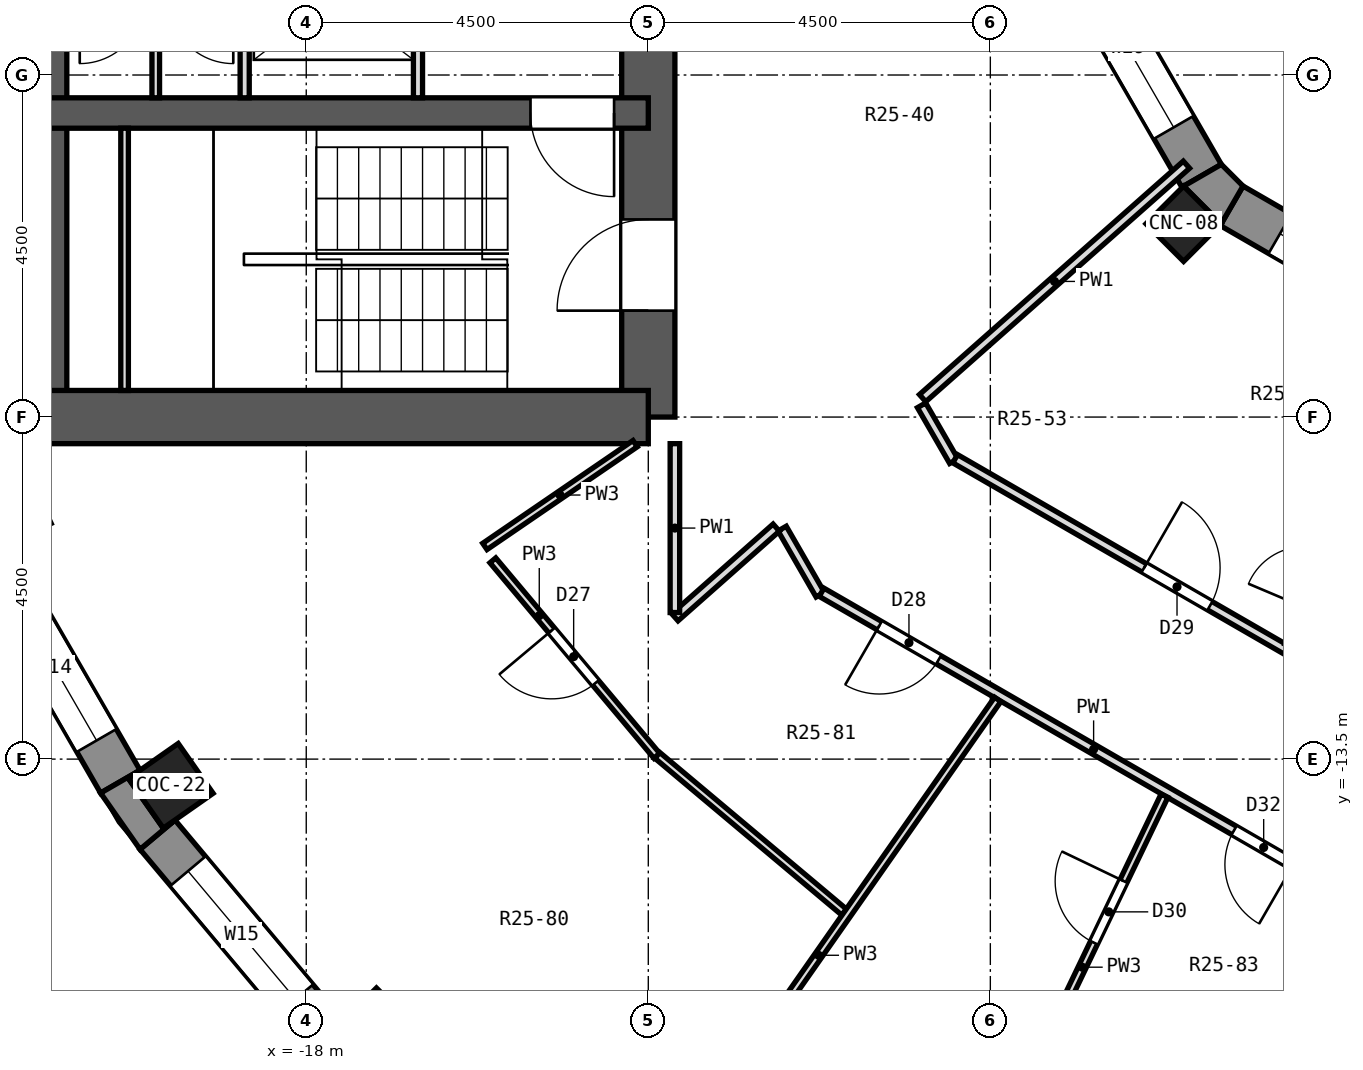
"""IFC4 building model, lengths in metres.
Left out: names, types, materials, properties, quantities, classifications, styles, units other than length and angle.
Written with IfcOpenShell. Run it as: python <this file> out.ifc"""

import sys

from ifc_helpers import new_model, si_unit, direction, frame, frame_2d, origin, origin_2d, place, context, subcontext, project, spatial, polyline, rectangle, outline, extrude, element, fill, save


model = new_model("IFC4")
c1 = context("Model", 3, precision=1e-05, world=origin(), true_north=direction((0.0, 1.0)))
c2 = subcontext(c1, "Body", "Model", "MODEL_VIEW")
j1 = project(units=[si_unit("LENGTHUNIT", "METRE"), si_unit("PLANEANGLEUNIT", "RADIAN")], contexts=[c1])
p1 = place(None, origin())
s1 = spatial("IfcSite", under=j1, at=p1, CompositionType="ELEMENT")
p2 = place(p1, origin())
s2 = spatial("IfcBuilding", under=s1, at=p2, CompositionType="ELEMENT")
p3 = place(p2, frame((0.0, 0.0, 160.8)))
s3 = spatial("IfcBuildingStorey", under=s2, at=p3, CompositionType="ELEMENT", Elevation=160.8)
for number, where, z_axis, x_axis in (
    (1, (-19.782, -13.852, 0.0), (0.0, 0.0, 1.0), (-0.819, -0.574, 0.0)),
    (2, (-17.077, -17.077, 0.0), (0.0, 0.0, 1.0), (-0.707, -0.707, 0.0)),
):
    element("IfcColumn", number, at=place(p3, frame(where, z_axis=z_axis, x_axis=x_axis)), inside=s3, PredefinedType="COLUMN", context=c2, shape_type="SweptSolid", body=[
        extrude(rectangle(XDim=0.8, YDim=0.8, at=origin_2d()), origin(), (0.0, 0.0, 1.0), 3.3),
    ])
p4 = place(p3, frame((-6.458, -6.458, 0.0), z_axis=(0.0, 0.0, 1.0), x_axis=(-0.707106781187, -0.707106781187, 0.0)))
e3 = element("IfcColumn", 3, at=p4, inside=s3, PredefinedType="COLUMN", context=c2, shape_type="SweptSolid", body=[
    extrude(rectangle(XDim=0.7, YDim=0.7, at=origin_2d()), origin(), (0.0, 0.0, 1.0), 3.3),
])
p5 = place(p3, frame((-13.5, -9.0, 0.0), z_axis=(0.0, 0.0, 1.0), x_axis=(0.0, 1.0, 0.0)))
e4 = element("IfcWall", 4, at=p5, inside=s3, PredefinedType="SHEAR", context=c2, shape_type="SweptSolid", body=[
    extrude(rectangle(XDim=18.0, YDim=0.7, at=frame_2d((9.0, 0.0))), origin(), (0.0, 0.0, 1.0), 3.3),
])
p6 = place(p5, frame((15.4, 0.0, 0.0)))
e5 = element("IfcOpeningElement", 5, at=p6, cuts=e4, PredefinedType="OPENING", context=c2, shape_type="SweptSolid", body=[
    extrude(rectangle(XDim=1.2, YDim=2.1, at=frame_2d((0.6, 1.05))), frame((0.0, 0.362, 0.0), z_axis=(0.0, -1.0, 0.0), x_axis=(1.0, 0.0, 0.0)), (0.0, 0.0, 1.0), 0.724),
])
p7 = place(p5, frame((1.4, 0.0, 0.0)))
e6 = element("IfcOpeningElement", 6, at=p7, cuts=e4, PredefinedType="OPENING", context=c2, shape_type="SweptSolid", body=[
    extrude(rectangle(XDim=1.2, YDim=2.1, at=frame_2d((0.6, 1.05))), frame((0.0, 0.362, 0.0), z_axis=(0.0, -1.0, 0.0), x_axis=(1.0, 0.0, 0.0)), (0.0, 0.0, 1.0), 0.724),
])
p8 = place(p5, frame((7.5, 0.0, 0.0)))
e7 = element("IfcOpeningElement", 7, at=p8, cuts=e4, PredefinedType="OPENING", context=c2, shape_type="SweptSolid", body=[
    extrude(rectangle(XDim=3.0, YDim=2.4, at=frame_2d((1.5, 1.2))), frame((0.0, 0.362, 0.0), z_axis=(0.0, -1.0, 0.0), x_axis=(1.0, 0.0, 0.0)), (0.0, 0.0, 1.0), 0.724),
])
p9 = place(p3, frame((-21.5, -9.0, 0.0), z_axis=(0.0, 0.0, 1.0), x_axis=(0.0, 1.0, 0.0)))
e8 = element("IfcWall", 8, at=p9, inside=s3, PredefinedType="SHEAR", context=c2, shape_type="SweptSolid", body=[
    extrude(rectangle(XDim=18.0, YDim=0.7, at=frame_2d((9.0, 0.0))), origin(), (0.0, 0.0, 1.0), 3.3),
])
p10 = place(p9, frame((9.45, 0.0, 0.0)))
e9 = element("IfcOpeningElement", 9, at=p10, cuts=e8, PredefinedType="OPENING", context=c2, shape_type="SweptSolid", body=[
    extrude(rectangle(XDim=0.9, YDim=2.1, at=frame_2d((0.45, 1.05))), frame((0.0, 0.362, 0.0), z_axis=(0.0, -1.0, 0.0), x_axis=(1.0, 0.0, 0.0)), (0.0, 0.0, 1.0), 0.724),
])
p11 = place(p9, frame((7.65, 0.0, 0.0)))
e10 = element("IfcOpeningElement", 10, at=p11, cuts=e8, PredefinedType="OPENING", context=c2, shape_type="SweptSolid", body=[
    extrude(rectangle(XDim=0.9, YDim=2.1, at=frame_2d((0.45, 1.05))), frame((0.0, 0.362, 0.0), z_axis=(0.0, -1.0, 0.0), x_axis=(1.0, 0.0, 0.0)), (0.0, 0.0, 1.0), 0.724),
])
p12 = place(p3, frame((-13.5, -9.0, 0.0), z_axis=(0.0, 0.0, 1.0), x_axis=(-1.0, 0.0, 0.0)))
e11 = element("IfcWall", 11, at=p12, inside=s3, PredefinedType="SHEAR", context=c2, shape_type="SweptSolid", body=[
    extrude(rectangle(XDim=8.0, YDim=0.7, at=frame_2d((4.0, 0.0))), origin(), (0.0, 0.0, 1.0), 3.3),
])
p13 = place(p3, frame((-13.5, -5.0, 0.0), z_axis=(0.0, 0.0, 1.0), x_axis=(-1.0, 0.0, 0.0)))
e12 = element("IfcWall", 12, at=p13, inside=s3, PredefinedType="SHEAR", context=c2, shape_type="SweptSolid", body=[
    extrude(rectangle(XDim=8.0, YDim=0.4, at=frame_2d((4.0, 0.0))), origin(), (0.0, 0.0, 1.0), 3.3),
])
p14 = place(p13, frame((0.45, 0.0, 0.0)))
e13 = element("IfcOpeningElement", 13, at=p14, cuts=e12, PredefinedType="OPENING", context=c2, shape_type="SweptSolid", body=[
    extrude(rectangle(XDim=1.1, YDim=2.1, at=frame_2d((0.55, 1.05))), frame((0.0, 0.212, 0.0), z_axis=(0.0, -1.0, 0.0), x_axis=(1.0, 0.0, 0.0)), (0.0, 0.0, 1.0), 0.424),
])
p15 = place(p3, frame((-22.171, -10.809, 0.0), z_axis=(0.0, 0.0, 1.0), x_axis=(0.499998129301, -0.86602648383, 0.0)))
e14 = element("IfcWall", 14, at=p15, inside=s3, PredefinedType="SOLIDWALL", context=c2, shape_type="SweptSolid", body=[
    extrude(rectangle(XDim=3.45, YDim=0.6, at=frame_2d((1.725, 0.0))), origin(), (0.0, 0.0, 1.0), 2.85),
])
p16 = place(p15, frame((0.625, 0.0, 0.9)))
e15 = element("IfcOpeningElement", 15, at=p16, cuts=e14, PredefinedType="OPENING", context=c2, shape_type="SweptSolid", body=[
    extrude(rectangle(XDim=2.2, YDim=1.8, at=frame_2d((1.1, 0.9))), frame((0.0, 0.312, 0.0), z_axis=(0.0, -1.0, 0.0), x_axis=(1.0, 0.0, 0.0)), (0.0, 0.0, 1.0), 0.624),
])
p17 = place(p3, frame((-19.957, -14.494, 0.0), z_axis=(0.0, 0.0, 1.0), x_axis=(0.642770398358, -0.766058884809, 0.0)))
e16 = element("IfcWall", 16, at=p17, inside=s3, PredefinedType="SOLIDWALL", context=c2, shape_type="SweptSolid", body=[
    extrude(rectangle(XDim=3.449, YDim=0.6, at=frame_2d((1.725, 0.0))), origin(), (0.0, 0.0, 1.0), 2.85),
])
p18 = place(p17, frame((0.625, 0.0, 0.9)))
e17 = element("IfcOpeningElement", 17, at=p18, cuts=e16, PredefinedType="OPENING", context=c2, shape_type="SweptSolid", body=[
    extrude(rectangle(XDim=2.2, YDim=1.8, at=frame_2d((1.1, 0.9))), frame((0.0, 0.312, 0.0), z_axis=(0.0, -1.0, 0.0), x_axis=(1.0, 0.0, 0.0)), (0.0, 0.0, 1.0), 0.624),
])
p19 = place(p3, origin())
e18 = element("IfcWall", 18, at=p19, inside=s3, PredefinedType="SOLIDWALL", context=c2, shape_type="SweptSolid", body=[
    extrude(outline(polyline([(-20.706, -13.946), (-20.187, -14.687), (-19.727, -14.302), (-19.881, -14.409), (-20.34, -13.754), (-20.186, -13.646), (-20.706, -13.946)])), origin(), (0.0, 0.0, 1.0), 2.85),
])
p20 = place(p3, frame((-8.156, -2.474, 0.0), z_axis=(0.0, 0.0, 1.0), x_axis=(0.500033728941, -0.866005929495, 0.0)))
e19 = element("IfcWall", 19, at=p20, inside=s3, PredefinedType="SOLIDWALL", context=c2, shape_type="SweptSolid", body=[
    extrude(rectangle(XDim=3.87, YDim=0.6, at=frame_2d((1.935, 0.0))), origin(), (0.0, 0.0, 1.0), 2.85),
])
p21 = place(p20, frame((0.735, 0.0, 0.9)))
e20 = element("IfcOpeningElement", 20, at=p21, cuts=e19, PredefinedType="OPENING", context=c2, shape_type="SweptSolid", body=[
    extrude(rectangle(XDim=2.4, YDim=1.8, at=frame_2d((1.2, 0.9))), frame((0.0, 0.312, 0.0), z_axis=(0.0, -1.0, 0.0), x_axis=(1.0, 0.0, 0.0)), (0.0, 0.0, 1.0), 0.624),
])
p22 = place(p3, frame((-5.826, -6.22, 0.0), z_axis=(0.0, 0.0, 1.0), x_axis=(0.866005929495, -0.500033728941, 0.0)))
e21 = element("IfcWall", 21, at=p22, inside=s3, PredefinedType="SOLIDWALL", context=c2, shape_type="SweptSolid", body=[
    extrude(rectangle(XDim=3.87, YDim=0.6, at=frame_2d((1.935, 0.0))), origin(), (0.0, 0.0, 1.0), 2.85),
])
p23 = place(p22, frame((0.735, 0.0, 0.9)))
e22 = element("IfcOpeningElement", 22, at=p23, cuts=e21, PredefinedType="OPENING", context=c2, shape_type="SweptSolid", body=[
    extrude(rectangle(XDim=2.4, YDim=1.8, at=frame_2d((1.2, 0.9))), frame((0.0, 0.312, 0.0), z_axis=(0.0, -1.0, 0.0), x_axis=(1.0, 0.0, 0.0)), (0.0, 0.0, 1.0), 0.624),
])
p24 = place(p3, origin())
e23 = element("IfcWall", 23, at=p24, inside=s3, PredefinedType="SOLIDWALL", context=c2, shape_type="SweptSolid", body=[
    extrude(outline(polyline([(-6.458, -5.962), (-5.962, -6.458), (-5.676, -5.961), (-5.961, -5.676), (-6.458, -5.962)])), origin(), (0.0, 0.0, 1.0), 2.85),
])
p25 = place(p3, frame((-11.739, -10.467, 0.0), z_axis=(0.0, 0.0, 1.0), x_axis=(0.499097354853, -0.866545919371, 0.0)))
e24 = element("IfcWall", 24, at=p25, inside=s3, PredefinedType="PARTITIONING", context=c2, shape_type="SweptSolid", body=[
    extrude(rectangle(XDim=1.003, YDim=0.125, at=frame_2d((0.501, 0.0))), origin(), (0.0, 0.0, 1.0), 2.85),
])
p26 = place(p3, frame((-9.905, -8.845, 0.0), z_axis=(0.0, 0.0, 1.0), x_axis=(0.499855389907, -0.866108878364, 0.0)))
e25 = element("IfcWall", 25, at=p26, inside=s3, PredefinedType="PARTITIONING", context=c2, shape_type="SweptSolid", body=[
    extrude(rectangle(XDim=0.848, YDim=0.125, at=frame_2d((0.424, 0.0))), origin(), (0.0, 0.0, 1.0), 2.85),
])
p27 = place(p3, frame((-15.545, -10.885, 0.0), z_axis=(0.0, 0.0, 1.0), x_axis=(0.642690725871, -0.766125727854, 0.0)))
e26 = element("IfcWall", 26, at=p27, inside=s3, PredefinedType="PARTITIONING", context=c2, shape_type="SweptSolid", body=[
    extrude(rectangle(XDim=3.358, YDim=0.1, at=frame_2d((1.679, 0.0))), origin(), (0.0, 0.0, 1.0), 2.85),
])
p28 = place(p27, frame((1.204, 0.0, 0.0)))
e27 = element("IfcOpeningElement", 27, at=p28, cuts=e26, PredefinedType="OPENING", context=c2, shape_type="SweptSolid", body=[
    extrude(rectangle(XDim=0.9, YDim=2.1, at=frame_2d((0.45, 1.05))), frame((0.0, 0.062, 0.0), z_axis=(0.0, -1.0, 0.0), x_axis=(1.0, 0.0, 0.0)), (0.0, 0.0, 1.0), 0.124),
])
p29 = place(p3, frame((-13.381, -13.451, 0.0), z_axis=(0.0, 0.0, 1.0), x_axis=(0.766064597799, -0.642763589509, 0.0)))
e28 = element("IfcWall", 28, at=p29, inside=s3, PredefinedType="PARTITIONING", context=c2, shape_type="SweptSolid", body=[
    extrude(rectangle(XDim=3.208, YDim=0.1, at=frame_2d((1.604, 0.0))), origin(), (0.0, 0.0, 1.0), 2.85),
])
p30 = place(p3, frame((-11.22, -11.305, 0.0), z_axis=(0.0, 0.0, 1.0), x_axis=(0.866074891173, -0.499914275531, 0.0)))
e29 = element("IfcWall", 29, at=p30, inside=s3, PredefinedType="PARTITIONING", context=c2, shape_type="SweptSolid", body=[
    extrude(rectangle(XDim=8.263, YDim=0.125, at=frame_2d((4.132, 0.0))), origin(), (0.0, 0.0, 1.0), 2.85),
])
p31 = place(p30, frame((0.877, 0.0, 0.0)))
e30 = element("IfcOpeningElement", 30, at=p31, cuts=e29, PredefinedType="OPENING", context=c2, shape_type="SweptSolid", body=[
    extrude(rectangle(XDim=0.9, YDim=2.1, at=frame_2d((0.45, 1.05))), frame((0.0, 0.074, 0.0), z_axis=(0.0, -1.0, 0.0), x_axis=(1.0, 0.0, 0.0)), (0.0, 0.0, 1.0), 0.149),
])
p32 = place(p30, frame((6.265, 0.0, 0.0)))
e31 = element("IfcOpeningElement", 31, at=p32, cuts=e29, PredefinedType="OPENING", context=c2, shape_type="SweptSolid", body=[
    extrude(rectangle(XDim=0.9, YDim=2.1, at=frame_2d((0.45, 1.05))), frame((0.0, 0.074, 0.0), z_axis=(0.0, -1.0, 0.0), x_axis=(1.0, 0.0, 0.0)), (0.0, 0.0, 1.0), 0.149),
])
p33 = place(p3, frame((-9.463, -9.548, 0.0), z_axis=(0.0, 0.0, 1.0), x_axis=(0.866077207726, -0.499910262205, 0.0)))
e32 = element("IfcWall", 32, at=p33, inside=s3, PredefinedType="PARTITIONING", context=c2, shape_type="SweptSolid", body=[
    extrude(rectangle(XDim=6.977, YDim=0.125, at=frame_2d((3.488, 0.0))), origin(), (0.0, 0.0, 1.0), 2.85),
])
p34 = place(p33, frame((2.87, 0.0, 0.0)))
e33 = element("IfcOpeningElement", 33, at=p34, cuts=e32, PredefinedType="OPENING", context=c2, shape_type="SweptSolid", body=[
    extrude(rectangle(XDim=1.0, YDim=2.1, at=frame_2d((0.5, 1.05))), frame((0.0, 0.074, 0.0), z_axis=(0.0, -1.0, 0.0), x_axis=(1.0, 0.0, 0.0)), (0.0, 0.0, 1.0), 0.149),
])
p35 = place(p3, frame((-15.65, -10.702, 0.0), z_axis=(0.0, 0.0, 1.0), x_axis=(0.82545226585, 0.564471927382, 0.0)))
e34 = element("IfcWall", 34, at=p35, inside=s3, PredefinedType="PARTITIONING", context=c2, shape_type="SweptSolid", body=[
    extrude(rectangle(XDim=2.395, YDim=0.1, at=frame_2d((1.197, 0.0))), origin(), (0.0, 0.0, 1.0), 2.85),
])
p36 = place(p3, frame((-13.15, -11.634, 0.0), z_axis=(0.0, 0.0, 1.0), x_axis=(0.748988708904, 0.662582760065, 0.0)))
e35 = element("IfcWall", 35, at=p36, inside=s3, PredefinedType="PARTITIONING", context=c2, shape_type="SweptSolid", body=[
    extrude(rectangle(XDim=1.78, YDim=0.125, at=frame_2d((0.89, 0.0))), origin(), (0.0, 0.0, 1.0), 2.85),
])
p37 = place(p3, frame((-9.891, -8.751, 0.0), z_axis=(0.0, 0.0, 1.0), x_axis=(0.748982485585, 0.662589794886, 0.0)))
e36 = element("IfcWall", 36, at=p37, inside=s3, PredefinedType="PARTITIONING", context=c2, shape_type="SweptSolid", body=[
    extrude(rectangle(XDim=4.635, YDim=0.125, at=frame_2d((2.317, 0.0))), origin(), (0.0, 0.0, 1.0), 2.85),
])
p38 = place(p3, frame((-13.617, -19.447, 0.0), z_axis=(0.0, 0.0, 1.0), x_axis=(0.573585951544, 0.819145381597, 0.0)))
e37 = element("IfcWall", 37, at=p38, inside=s3, PredefinedType="PARTITIONING", context=c2, shape_type="SweptSolid", body=[
    extrude(rectangle(XDim=8.218, YDim=0.1, at=frame_2d((4.109, 0.0))), origin(), (0.0, 0.0, 1.0), 2.85),
])
p39 = place(p3, frame((-8.202, -17.094, 0.0), z_axis=(0.0, 0.0, 1.0), x_axis=(0.432471241397, 0.901647727976, 0.0)))
e38 = element("IfcWall", 38, at=p39, inside=s3, PredefinedType="PARTITIONING", context=c2, shape_type="SweptSolid", body=[
    extrude(rectangle(XDim=3.452, YDim=0.1, at=frame_2d((1.726, 0.0))), origin(), (0.0, 0.0, 1.0), 2.85),
])
p40 = place(p39, frame((1.307, 0.0, 0.0)))
e39 = element("IfcOpeningElement", 39, at=p40, cuts=e38, PredefinedType="OPENING", context=c2, shape_type="SweptSolid", body=[
    extrude(rectangle(XDim=0.9, YDim=2.1, at=frame_2d((0.45, 1.05))), frame((0.0, 0.062, 0.0), z_axis=(0.0, -1.0, 0.0), x_axis=(1.0, 0.0, 0.0)), (0.0, 0.0, 1.0), 0.124),
])
p41 = place(p3, frame((-13.15, -11.572, 0.0), z_axis=(0.0, 0.0, 1.0), x_axis=(0.0, 1.0, 0.0)))
e40 = element("IfcWall", 40, at=p41, inside=s3, PredefinedType="PARTITIONING", context=c2, shape_type="SweptSolid", body=[
    extrude(rectangle(XDim=2.221, YDim=0.125, at=frame_2d((1.111, 0.0))), origin(), (0.0, 0.0, 1.0), 2.85),
])
p42 = place(p3, frame((-16.53, -4.8, 0.0), z_axis=(0.0, 0.0, 1.0), x_axis=(0.0, 1.0, 0.0)))
e41 = element("IfcWall", 41, at=p42, inside=s3, PredefinedType="PARTITIONING", context=c2, shape_type="SweptSolid", body=[
    extrude(rectangle(XDim=2.6, YDim=0.12, at=frame_2d((1.3, 0.0))), origin(), (0.0, 0.0, 1.0), 2.85),
])
p43 = place(p42, frame((0.75, 0.0, 0.0)))
e42 = element("IfcOpeningElement", 42, at=p43, cuts=e41, PredefinedType="OPENING", context=c2, shape_type="SweptSolid", body=[
    extrude(rectangle(XDim=1.1, YDim=2.1, at=frame_2d((0.55, 1.05))), frame((0.0, 0.072, 0.0), z_axis=(0.0, -1.0, 0.0), x_axis=(1.0, 0.0, 0.0)), (0.0, 0.0, 1.0), 0.144),
])
p44 = place(p3, frame((-18.81, -4.8, 0.0), z_axis=(0.0, 0.0, 1.0), x_axis=(0.0, 1.0, 0.0)))
e43 = element("IfcWall", 43, at=p44, inside=s3, PredefinedType="PARTITIONING", context=c2, shape_type="SweptSolid", body=[
    extrude(rectangle(XDim=2.6, YDim=0.12, at=frame_2d((1.3, 0.0))), origin(), (0.0, 0.0, 1.0), 2.85),
])
p45 = place(p3, frame((-19.98, -4.8, 0.0), z_axis=(0.0, 0.0, 1.0), x_axis=(0.0, 1.0, 0.0)))
e44 = element("IfcWall", 44, at=p45, inside=s3, PredefinedType="PARTITIONING", context=c2, shape_type="SweptSolid", body=[
    extrude(rectangle(XDim=2.6, YDim=0.1, at=frame_2d((1.3, 0.0))), origin(), (0.0, 0.0, 1.0), 2.85),
])
p46 = place(p3, frame((-20.39, -8.65, 0.0), z_axis=(0.0, 0.0, 1.0), x_axis=(0.0, 1.0, 0.0)))
e45 = element("IfcWall", 45, at=p46, inside=s3, PredefinedType="PARTITIONING", context=c2, shape_type="SweptSolid", body=[
    extrude(rectangle(XDim=3.45, YDim=0.1, at=frame_2d((1.725, 0.0))), origin(), (0.0, 0.0, 1.0), 2.85),
])
p47 = place(p16, origin())
e46 = element("IfcWindow", 46, at=p47, inside=s3, PartitioningType="SINGLE_PANEL", PredefinedType="WINDOW", context=c2, shape_type="SweptSolid", body=[
    extrude(rectangle(XDim=2.2, YDim=1.8, at=frame_2d((1.1, 0.9))), frame((0.0, 0.18, 0.0), z_axis=(0.0, -1.0, 0.0), x_axis=(1.0, 0.0, 0.0)), (0.0, 0.0, 1.0), 0.06),
])
fill(e15, e46)
p48 = place(p18, origin())
e47 = element("IfcWindow", 47, at=p48, inside=s3, PartitioningType="SINGLE_PANEL", PredefinedType="WINDOW", context=c2, shape_type="SweptSolid", body=[
    extrude(rectangle(XDim=2.2, YDim=1.8, at=frame_2d((1.1, 0.9))), frame((0.0, 0.18, 0.0), z_axis=(0.0, -1.0, 0.0), x_axis=(1.0, 0.0, 0.0)), (0.0, 0.0, 1.0), 0.06),
])
fill(e17, e47)
p49 = place(p21, origin())
e48 = element("IfcWindow", 48, at=p49, inside=s3, PartitioningType="SINGLE_PANEL", PredefinedType="WINDOW", context=c2, shape_type="SweptSolid", body=[
    extrude(rectangle(XDim=2.4, YDim=1.8, at=frame_2d((1.2, 0.9))), frame((0.0, -0.12, 0.0), z_axis=(0.0, -1.0, 0.0), x_axis=(1.0, 0.0, 0.0)), (0.0, 0.0, 1.0), 0.06),
])
fill(e20, e48)
p50 = place(p23, origin())
e49 = element("IfcWindow", 49, at=p50, inside=s3, PartitioningType="SINGLE_PANEL", PredefinedType="WINDOW", context=c2, shape_type="SweptSolid", body=[
    extrude(rectangle(XDim=2.4, YDim=1.8, at=frame_2d((1.2, 0.9))), frame((0.0, -0.12, 0.0), z_axis=(0.0, -1.0, 0.0), x_axis=(1.0, 0.0, 0.0)), (0.0, 0.0, 1.0), 0.06),
])
fill(e22, e49)
p51 = place(p28, frame((0.9, 0.0, 0.0), z_axis=(0.0, 0.0, 1.0), x_axis=(-1.0, 0.0, 0.0)))
e50 = element("IfcDoor", 50, at=p51, inside=s3, OperationType="SINGLE_SWING_RIGHT", PredefinedType="DOOR", context=c2, shape_type="SweptSolid", body=[
    extrude(rectangle(XDim=0.9, YDim=2.1, at=frame_2d((0.45, 1.05))), frame((0.0, 0.025, 0.0), z_axis=(0.0, -1.0, 0.0), x_axis=(1.0, 0.0, 0.0)), (0.0, 0.0, 1.0), 0.05),
])
fill(e27, e50)
p52 = place(p31, frame((0.9, 0.0, 0.0), z_axis=(0.0, 0.0, 1.0), x_axis=(-1.0, 0.0, 0.0)))
e51 = element("IfcDoor", 51, at=p52, inside=s3, OperationType="SINGLE_SWING_RIGHT", PredefinedType="DOOR", context=c2, shape_type="SweptSolid", body=[
    extrude(rectangle(XDim=0.9, YDim=2.1, at=frame_2d((0.45, 1.05))), frame((0.0, 0.025, 0.0), z_axis=(0.0, -1.0, 0.0), x_axis=(1.0, 0.0, 0.0)), (0.0, 0.0, 1.0), 0.05),
])
fill(e30, e51)
p53 = place(p34, origin())
e52 = element("IfcDoor", 52, at=p53, inside=s3, OperationType="SINGLE_SWING_LEFT", PredefinedType="DOOR", context=c2, shape_type="SweptSolid", body=[
    extrude(rectangle(XDim=1.0, YDim=2.1, at=frame_2d((0.5, 1.05))), frame((0.0, 0.025, 0.0), z_axis=(0.0, -1.0, 0.0), x_axis=(1.0, 0.0, 0.0)), (0.0, 0.0, 1.0), 0.05),
])
fill(e33, e52)
p54 = place(p40, origin())
e53 = element("IfcDoor", 53, at=p54, inside=s3, OperationType="SINGLE_SWING_RIGHT", PredefinedType="DOOR", context=c2, shape_type="SweptSolid", body=[
    extrude(rectangle(XDim=0.9, YDim=2.1, at=frame_2d((0.45, 1.05))), frame((0.0, 0.025, 0.0), z_axis=(0.0, -1.0, 0.0), x_axis=(1.0, 0.0, 0.0)), (0.0, 0.0, 1.0), 0.05),
])
fill(e39, e53)
p55 = place(p32, frame((0.9, 0.0, 0.0), z_axis=(0.0, 0.0, 1.0), x_axis=(-1.0, 0.0, 0.0)))
e54 = element("IfcDoor", 54, at=p55, inside=s3, OperationType="SINGLE_SWING_LEFT", PredefinedType="DOOR", context=c2, shape_type="SweptSolid", body=[
    extrude(rectangle(XDim=0.9, YDim=2.1, at=frame_2d((0.45, 1.05))), frame((0.0, 0.025, 0.0), z_axis=(0.0, -1.0, 0.0), x_axis=(1.0, 0.0, 0.0)), (0.0, 0.0, 1.0), 0.05),
])
fill(e31, e54)
p56 = place(p14, origin())
e55 = element("IfcDoor", 55, at=p56, inside=s3, OperationType="SINGLE_SWING_LEFT", PredefinedType="DOOR", context=c2, shape_type="SweptSolid", body=[
    extrude(rectangle(XDim=1.1, YDim=2.1, at=frame_2d((0.55, 1.05))), frame((0.0, 0.025, 0.0), z_axis=(0.0, -1.0, 0.0), x_axis=(1.0, 0.0, 0.0)), (0.0, 0.0, 1.0), 0.05),
])
fill(e13, e55)
p57 = place(p7, origin())
e56 = element("IfcDoor", 56, at=p57, inside=s3, OperationType="SINGLE_SWING_LEFT", PredefinedType="DOOR", context=c2, shape_type="SweptSolid", body=[
    extrude(rectangle(XDim=1.2, YDim=2.1, at=frame_2d((0.6, 1.05))), frame((0.0, 0.025, 0.0), z_axis=(0.0, -1.0, 0.0), x_axis=(1.0, 0.0, 0.0)), (0.0, 0.0, 1.0), 0.05),
])
fill(e6, e56)
save(model, sys.argv[1])
